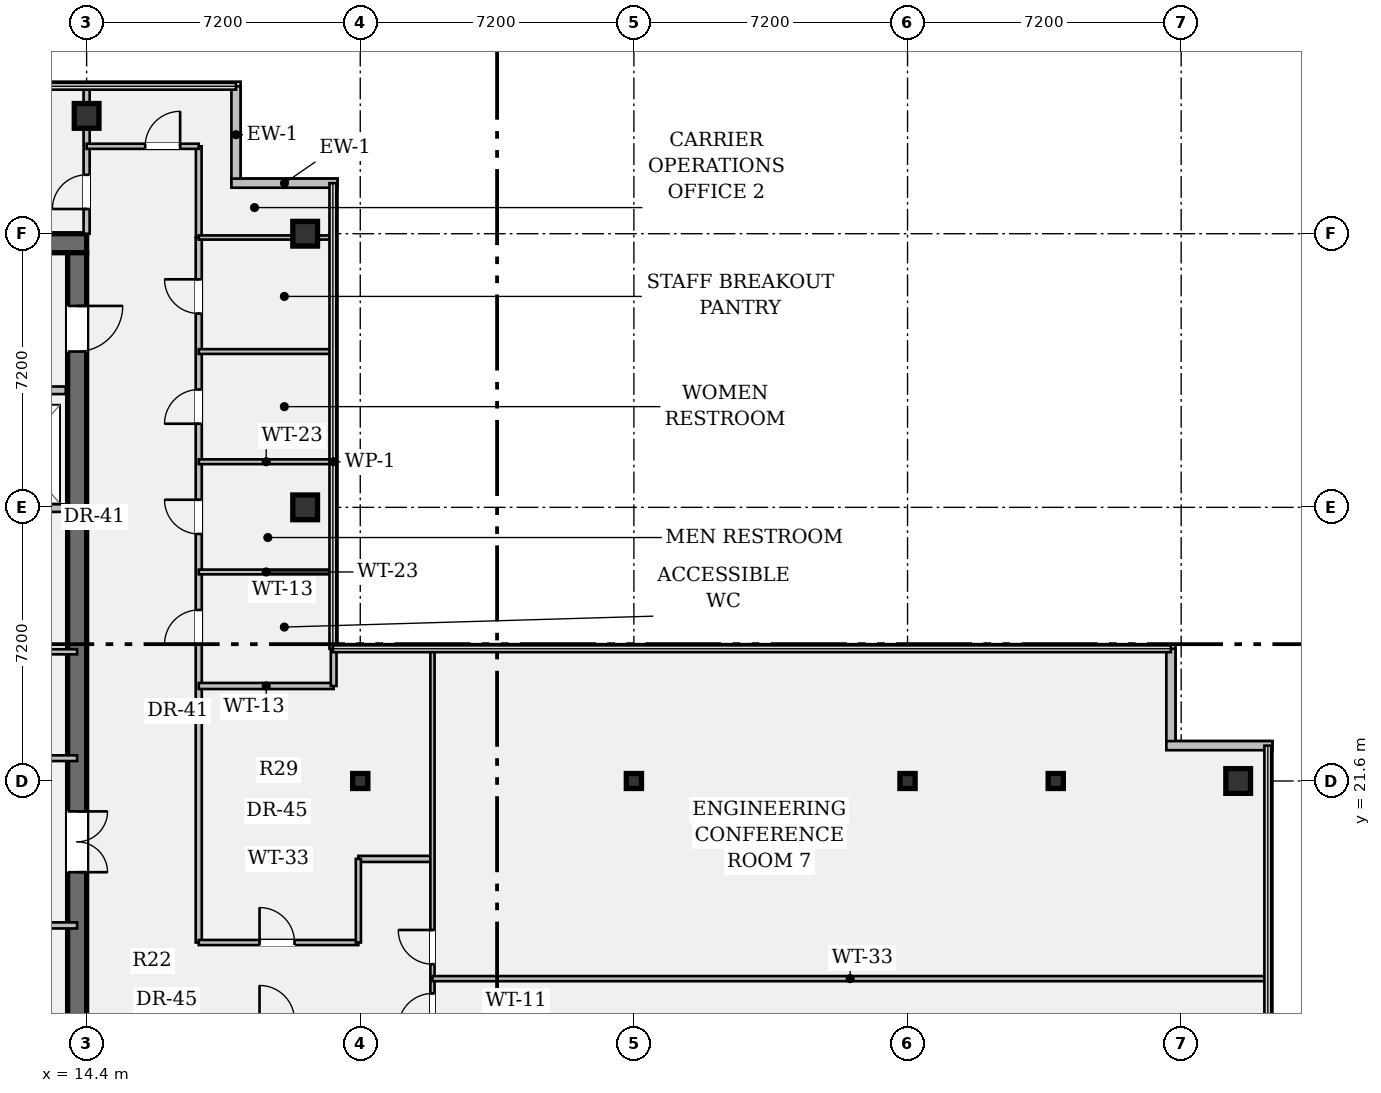
"""IFC4 building model, lengths in metres.
Left out: names, types, materials, properties, quantities, classifications, styles, units other than length and angle.
Written with IfcOpenShell. Run it as: python <this file> out.ifc"""

import sys

from ifc_helpers import new_model, si_unit, direction, frame, frame_2d, origin, origin_2d, place, context, subcontext, project, spatial, rectangle, hollow_rectangle, i_section, extrude, element, fill, save


model = new_model("IFC4")
c1 = context("Model", 3, precision=1e-05, world=origin(), true_north=direction((0.0, 1.0)))
c2 = subcontext(c1, "Body", "Model", "MODEL_VIEW")
j1 = project(units=[si_unit("LENGTHUNIT", "METRE"), si_unit("PLANEANGLEUNIT", "RADIAN")], contexts=[c1])
p1 = place(None, origin())
s1 = spatial("IfcSite", under=j1, at=p1, CompositionType="ELEMENT")
p2 = place(p1, origin())
s2 = spatial("IfcBuilding", under=s1, at=p2, CompositionType="ELEMENT")
p3 = place(p2, frame((0.0, 0.0, 258.65)))
s3 = spatial("IfcBuildingStorey", under=s2, at=p3, CompositionType="ELEMENT", Elevation=258.65)
p4 = place(p3, frame((0.5, 35.75, 0.0), z_axis=(0.0, 0.0, 1.0), x_axis=(1.0, 0.0, 0.0)))
e1 = element("IfcWall", 1, at=p4, inside=s3, PredefinedType="SHEAR", context=c2, shape_type="SweptSolid", body=[
    extrude(rectangle(XDim=13.9, YDim=0.5, at=frame_2d((6.95, 0.0))), origin(), (0.0, 0.0, 1.0), 3.24),
])
p5 = place(p3, frame((14.15, 35.5, 0.0), z_axis=(0.0, 0.0, 1.0), x_axis=(0.0, -1.0, 0.0)))
e2 = element("IfcWall", 2, at=p5, inside=s3, PredefinedType="SHEAR", context=c2, shape_type="SweptSolid", body=[
    extrude(rectangle(XDim=27.8, YDim=0.5, at=frame_2d((13.9, 0.0))), origin(), (0.0, 0.0, 1.0), 3.24),
])
p6 = place(p5, frame((1.4, 0.0, 0.0)))
e3 = element("IfcOpeningElement", 3, at=p6, cuts=e2, PredefinedType="OPENING", context=c2, shape_type="SweptSolid", body=[
    extrude(rectangle(XDim=1.2, YDim=2.15, at=frame_2d((0.6, 1.075))), frame((0.0, 0.262, 0.0), z_axis=(0.0, -1.0, 0.0), x_axis=(1.0, 0.0, 0.0)), (0.0, 0.0, 1.0), 0.524),
])
p7 = place(p5, frame((25.35, 0.0, 0.0)))
e4 = element("IfcOpeningElement", 4, at=p7, cuts=e2, PredefinedType="OPENING", context=c2, shape_type="SweptSolid", body=[
    extrude(rectangle(XDim=1.2, YDim=2.15, at=frame_2d((0.6, 1.075))), frame((0.0, 0.262, 0.0), z_axis=(0.0, -1.0, 0.0), x_axis=(1.0, 0.0, 0.0)), (0.0, 0.0, 1.0), 0.524),
])
p8 = place(p5, frame((14.7, 0.0, 0.0)))
e5 = element("IfcOpeningElement", 5, at=p8, cuts=e2, PredefinedType="OPENING", context=c2, shape_type="SweptSolid", body=[
    extrude(rectangle(XDim=1.6, YDim=2.2, at=frame_2d((0.8, 1.1))), frame((0.0, 0.262, 0.0), z_axis=(0.0, -1.0, 0.0), x_axis=(1.0, 0.0, 0.0)), (0.0, 0.0, 1.0), 0.524),
])
for number, where, z_axis, x_axis in (
    (6, (14.4, 39.1, 0.0), (0.0, 0.0, 1.0), (1.0, 0.0, 0.0)),
    (7, (20.15, 28.8, 0.0), (0.0, 0.0, 1.0), (1.0, 0.0, 0.0)),
    (8, (20.15, 36.0, 0.0), (0.0, 0.0, 1.0), (1.0, 0.0, 0.0)),
):
    element("IfcColumn", number, at=place(p3, frame(where, z_axis=z_axis, x_axis=x_axis)), inside=s3, PredefinedType="COLUMN", context=c2, shape_type="SweptSolid", body=[
        extrude(hollow_rectangle(XDim=0.65, YDim=0.65, WallThickness=0.04, at=origin_2d()), origin(), (0.0, 0.0, 1.0), 3.24),
    ])
for number, where, z_axis, x_axis in (
    (9, (21.6, 21.6, 0.0), (0.0, 0.0, 1.0), (1.0, 0.0, 0.0)),
    (10, (28.8, 21.6, 0.0), (0.0, 0.0, 1.0), (1.0, 0.0, 0.0)),
    (11, (36.0, 21.6, 0.0), (0.0, 0.0, 1.0), (1.0, 0.0, 0.0)),
    (12, (39.9, 21.6, 0.0), (0.0, 0.0, 1.0), (1.0, 0.0, 0.0)),
):
    element("IfcColumn", number, at=place(p3, frame(where, z_axis=z_axis, x_axis=x_axis)), inside=s3, PredefinedType="COLUMN", context=c2, shape_type="SweptSolid", body=[
        extrude(i_section(OverallWidth=0.399, OverallDepth=0.394, WebThickness=0.023, FlangeThickness=0.037, FilletRadius=0.018, at=origin_2d()), origin(), (0.0, 0.0, 1.0), 3.24),
    ])
p9 = place(p3, frame((44.7, 21.6, 0.0), z_axis=(0.0, 0.0, 1.0), x_axis=(1.0, 0.0, 0.0)))
e13 = element("IfcColumn", 13, at=p9, inside=s3, PredefinedType="COLUMN", context=c2, shape_type="SweptSolid", body=[
    extrude(hollow_rectangle(XDim=0.65, YDim=0.65, WallThickness=0.04, at=origin_2d()), origin(), (0.0, 0.0, 1.0), 3.24),
])
p10 = place(p3, frame((18.33, 39.88, 0.0), z_axis=(0.0, 0.0, 1.0), x_axis=(0.0, -1.0, 0.0)))
e14 = element("IfcWall", 14, at=p10, inside=s3, PredefinedType="STANDARD", context=c2, shape_type="SweptSolid", body=[
    extrude(rectangle(XDim=2.55, YDim=0.24, at=frame_2d((1.275, 0.0))), origin(), (0.0, 0.0, 1.0), 3.24),
])
p11 = place(p3, frame((18.21, 37.33, 0.0), z_axis=(0.0, 0.0, 1.0), x_axis=(1.0, 0.0, 0.0)))
e15 = element("IfcWall", 15, at=p11, inside=s3, PredefinedType="STANDARD", context=c2, shape_type="SweptSolid", body=[
    extrude(rectangle(XDim=2.79, YDim=0.24, at=frame_2d((1.395, 0.0))), origin(), (0.0, 0.0, 1.0), 3.24),
])
p12 = place(p3, frame((42.93, 25.08, 0.0), z_axis=(0.0, 0.0, 1.0), x_axis=(0.0, -1.0, 0.0)))
e16 = element("IfcWall", 16, at=p12, inside=s3, PredefinedType="STANDARD", context=c2, shape_type="SweptSolid", body=[
    extrude(rectangle(XDim=2.55, YDim=0.24, at=frame_2d((1.275, 0.0))), origin(), (0.0, 0.0, 1.0), 3.24),
])
p13 = place(p3, frame((42.81, 22.53, 0.0), z_axis=(0.0, 0.0, 1.0), x_axis=(1.0, 0.0, 0.0)))
e17 = element("IfcWall", 17, at=p13, inside=s3, PredefinedType="STANDARD", context=c2, shape_type="SweptSolid", body=[
    extrude(rectangle(XDim=2.79, YDim=0.24, at=frame_2d((1.395, 0.0))), origin(), (0.0, 0.0, 1.0), 3.24),
])
p14 = place(p3, frame((8.7, 31.88, 0.0), z_axis=(0.0, 0.0, 1.0), x_axis=(1.0, 0.0, 0.0)))
e18 = element("IfcWall", 18, at=p14, inside=s3, PredefinedType="PARTITIONING", context=c2, shape_type="SweptSolid", body=[
    extrude(rectangle(XDim=5.15, YDim=0.2, at=frame_2d((2.575, 0.0))), origin(), (0.0, 0.0, 1.0), 3.24),
])
p15 = place(p14, frame((0.75, 0.0, 0.0)))
e19 = element("IfcOpeningElement", 19, at=p15, cuts=e18, PredefinedType="OPENING", context=c2, shape_type="SweptSolid", body=[
    extrude(rectangle(XDim=1.2, YDim=2.2, at=frame_2d((0.6, 1.1))), frame((0.0, 0.112, 0.0), z_axis=(0.0, -1.0, 0.0), x_axis=(1.0, 0.0, 0.0)), (0.0, 0.0, 1.0), 0.224),
])
p16 = place(p14, frame((3.25, 0.0, 0.0)))
e20 = element("IfcOpeningElement", 20, at=p16, cuts=e18, PredefinedType="OPENING", context=c2, shape_type="SweptSolid", body=[
    extrude(rectangle(XDim=1.2, YDim=2.2, at=frame_2d((0.6, 1.1))), frame((0.0, 0.112, 0.0), z_axis=(0.0, -1.0, 0.0), x_axis=(1.0, 0.0, 0.0)), (0.0, 0.0, 1.0), 0.224),
])
p17 = place(p3, frame((8.7, 28.78, 0.0), z_axis=(0.0, 0.0, 1.0), x_axis=(1.0, 0.0, 0.0)))
e21 = element("IfcWall", 21, at=p17, inside=s3, PredefinedType="PARTITIONING", context=c2, shape_type="SweptSolid", body=[
    extrude(rectangle(XDim=5.15, YDim=0.2, at=frame_2d((2.575, 0.0))), origin(), (0.0, 0.0, 1.0), 3.24),
])
p18 = place(p3, frame((7.1, 22.2, 0.0), z_axis=(0.0, 0.0, 1.0), x_axis=(1.0, 0.0, 0.0)))
e22 = element("IfcWall", 22, at=p18, inside=s3, PredefinedType="PARTITIONING", context=c2, shape_type="SweptSolid", body=[
    extrude(rectangle(XDim=7.05, YDim=0.15, at=frame_2d((3.525, 0.0))), origin(), (0.0, 0.0, 1.0), 3.24),
])
p19 = place(p18, frame((2.4, 0.0, 0.0)))
e23 = element("IfcOpeningElement", 23, at=p19, cuts=e22, PredefinedType="OPENING", context=c2, shape_type="SweptSolid", body=[
    extrude(rectangle(XDim=0.92, YDim=2.15, at=frame_2d((0.46, 1.075))), frame((0.0, 0.087, 0.0), z_axis=(0.0, -1.0, 0.0), x_axis=(1.0, 0.0, 0.0)), (0.0, 0.0, 1.0), 0.174),
])
p20 = place(p3, frame((7.1, 25.0, 0.0), z_axis=(0.0, 0.0, 1.0), x_axis=(1.0, 0.0, 0.0)))
e24 = element("IfcWall", 24, at=p20, inside=s3, PredefinedType="PARTITIONING", context=c2, shape_type="SweptSolid", body=[
    extrude(rectangle(XDim=7.05, YDim=0.135, at=frame_2d((3.525, 0.0))), origin(), (0.0, 0.0, 1.0), 3.24),
])
p21 = place(p3, frame((5.15, 17.8, 0.0), z_axis=(0.0, 0.0, 1.0), x_axis=(1.0, 0.0, 0.0)))
e25 = element("IfcWall", 25, at=p21, inside=s3, PredefinedType="PARTITIONING", context=c2, shape_type="SweptSolid", body=[
    extrude(rectangle(XDim=9.0, YDim=0.16, at=frame_2d((4.5, 0.0))), origin(), (0.0, 0.0, 1.0), 3.24),
])
p22 = place(p21, frame((2.65, 0.0, 0.0)))
e26 = element("IfcOpeningElement", 26, at=p22, cuts=e25, PredefinedType="OPENING", context=c2, shape_type="SweptSolid", body=[
    extrude(rectangle(XDim=0.9, YDim=2.15, at=frame_2d((0.45, 1.075))), frame((0.0, 0.092, 0.0), z_axis=(0.0, -1.0, 0.0), x_axis=(1.0, 0.0, 0.0)), (0.0, 0.0, 1.0), 0.184),
])
p23 = place(p21, frame((6.15, 0.0, 0.0)))
e27 = element("IfcOpeningElement", 27, at=p23, cuts=e25, PredefinedType="OPENING", context=c2, shape_type="SweptSolid", body=[
    extrude(rectangle(XDim=0.92, YDim=2.15, at=frame_2d((0.46, 1.075))), frame((0.0, 0.092, 0.0), z_axis=(0.0, -1.0, 0.0), x_axis=(1.0, 0.0, 0.0)), (0.0, 0.0, 1.0), 0.184),
])
p24 = place(p3, frame((17.35, 17.35, 0.0), z_axis=(0.0, 0.0, 1.0), x_axis=(0.0, 1.0, 0.0)))
e28 = element("IfcWall", 28, at=p24, inside=s3, PredefinedType="PARTITIONING", context=c2, shape_type="SweptSolid", body=[
    extrude(rectangle(XDim=18.55, YDim=0.16, at=frame_2d((9.275, 0.0))), origin(), (0.0, 0.0, 1.0), 2.676),
])
p25 = place(p24, frame((7.85, 0.0, 0.0)))
e29 = element("IfcOpeningElement", 29, at=p25, cuts=e28, PredefinedType="OPENING", context=c2, shape_type="SweptSolid", body=[
    extrude(rectangle(XDim=0.9, YDim=2.15, at=frame_2d((0.45, 1.075))), frame((0.0, 0.092, 0.0), z_axis=(0.0, -1.0, 0.0), x_axis=(1.0, 0.0, 0.0)), (0.0, 0.0, 1.0), 0.184),
])
p26 = place(p24, frame((10.75, 0.0, 0.0)))
e30 = element("IfcOpeningElement", 30, at=p26, cuts=e28, PredefinedType="OPENING", context=c2, shape_type="SweptSolid", body=[
    extrude(rectangle(XDim=0.9, YDim=2.15, at=frame_2d((0.45, 1.075))), frame((0.0, 0.092, 0.0), z_axis=(0.0, -1.0, 0.0), x_axis=(1.0, 0.0, 0.0)), (0.0, 0.0, 1.0), 0.184),
])
p27 = place(p24, frame((13.65, 0.0, 0.0)))
e31 = element("IfcOpeningElement", 31, at=p27, cuts=e28, PredefinedType="OPENING", context=c2, shape_type="SweptSolid", body=[
    extrude(rectangle(XDim=0.9, YDim=2.15, at=frame_2d((0.45, 1.075))), frame((0.0, 0.092, 0.0), z_axis=(0.0, -1.0, 0.0), x_axis=(1.0, 0.0, 0.0)), (0.0, 0.0, 1.0), 0.184),
])
p28 = place(p24, frame((16.55, 0.0, 0.0)))
e32 = element("IfcOpeningElement", 32, at=p28, cuts=e28, PredefinedType="OPENING", context=c2, shape_type="SweptSolid", body=[
    extrude(rectangle(XDim=0.9, YDim=2.15, at=frame_2d((0.45, 1.075))), frame((0.0, 0.092, 0.0), z_axis=(0.0, -1.0, 0.0), x_axis=(1.0, 0.0, 0.0)), (0.0, 0.0, 1.0), 0.184),
])
p29 = place(p3, frame((17.35, 17.35, 0.0), z_axis=(0.0, 0.0, 1.0), x_axis=(1.0, 0.0, 0.0)))
e33 = element("IfcWall", 33, at=p29, inside=s3, PredefinedType="PARTITIONING", context=c2, shape_type="SweptSolid", body=[
    extrude(rectangle(XDim=4.2, YDim=0.135, at=frame_2d((2.1, 0.0))), origin(), (0.0, 0.0, 1.0), 2.808),
])
p30 = place(p29, frame((1.6, 0.0, 0.0)))
e34 = element("IfcOpeningElement", 34, at=p30, cuts=e33, PredefinedType="OPENING", context=c2, shape_type="SweptSolid", body=[
    extrude(rectangle(XDim=0.92, YDim=2.15, at=frame_2d((0.46, 1.075))), frame((0.0, 0.08, 0.0), z_axis=(0.0, -1.0, 0.0), x_axis=(1.0, 0.0, 0.0)), (0.0, 0.0, 1.0), 0.159),
])
p31 = place(p3, frame((21.55, 19.55, 0.0), z_axis=(0.0, 0.0, 1.0), x_axis=(1.0, 0.0, 0.0)))
e35 = element("IfcWall", 35, at=p31, inside=s3, PredefinedType="PARTITIONING", context=c2, shape_type="SweptSolid", body=[
    extrude(rectangle(XDim=1.95, YDim=0.16, at=frame_2d((0.975, 0.0))), origin(), (0.0, 0.0, 1.0), 2.676),
])
p32 = place(p3, frame((21.55, 17.35, 0.0), z_axis=(0.0, 0.0, 1.0), x_axis=(0.0, 1.0, 0.0)))
e36 = element("IfcWall", 36, at=p32, inside=s3, PredefinedType="PARTITIONING", context=c2, shape_type="SweptSolid", body=[
    extrude(rectangle(XDim=2.2, YDim=0.135, at=frame_2d((1.1, 0.0))), origin(), (0.0, 0.0, 1.0), 2.676),
])
p33 = place(p3, frame((23.5, 6.52, 0.0), z_axis=(0.0, 0.0, 1.0), x_axis=(0.0, 1.0, 0.0)))
e37 = element("IfcWall", 37, at=p33, inside=s3, PredefinedType="PARTITIONING", context=c2, shape_type="SweptSolid", body=[
    extrude(rectangle(XDim=18.56, YDim=0.11, at=frame_2d((9.28, 0.0))), origin(), (0.0, 0.0, 1.0), 2.676),
])
p34 = place(p33, frame((8.59, 0.0, 0.0)))
e38 = element("IfcOpeningElement", 38, at=p34, cuts=e37, PredefinedType="OPENING", context=c2, shape_type="SweptSolid", body=[
    extrude(rectangle(XDim=0.9, YDim=2.15, at=frame_2d((0.45, 1.075))), frame((0.0, 0.067, 0.0), z_axis=(0.0, -1.0, 0.0), x_axis=(1.0, 0.0, 0.0)), (0.0, 0.0, 1.0), 0.134),
])
p35 = place(p33, frame((10.26, 0.0, 0.0)))
e39 = element("IfcOpeningElement", 39, at=p35, cuts=e37, PredefinedType="OPENING", context=c2, shape_type="SweptSolid", body=[
    extrude(rectangle(XDim=0.9, YDim=2.15, at=frame_2d((0.45, 1.075))), frame((0.0, 0.067, 0.0), z_axis=(0.0, -1.0, 0.0), x_axis=(1.0, 0.0, 0.0)), (0.0, 0.0, 1.0), 0.134),
])
p36 = place(p3, frame((14.4, 36.0, 0.0), z_axis=(0.0, 0.0, 1.0), x_axis=(0.0, 1.0, 0.0)))
e40 = element("IfcWall", 40, at=p36, inside=s3, PredefinedType="PARTITIONING", context=c2, shape_type="SweptSolid", body=[
    extrude(rectangle(XDim=3.88, YDim=0.16, at=frame_2d((1.94, 0.0))), origin(), (0.0, 0.0, 1.0), 2.676),
])
p37 = place(p36, frame((0.65, 0.0, 0.0)))
e41 = element("IfcOpeningElement", 41, at=p37, cuts=e40, PredefinedType="OPENING", context=c2, shape_type="SweptSolid", body=[
    extrude(rectangle(XDim=0.9, YDim=2.15, at=frame_2d((0.45, 1.075))), frame((0.0, 0.092, 0.0), z_axis=(0.0, -1.0, 0.0), x_axis=(1.0, 0.0, 0.0)), (0.0, 0.0, 1.0), 0.184),
])
p38 = place(p3, frame((17.35, 35.9, 0.0), z_axis=(0.0, 0.0, 1.0), x_axis=(0.0, 1.0, 0.0)))
e42 = element("IfcWall", 42, at=p38, inside=s3, PredefinedType="PARTITIONING", context=c2, shape_type="SweptSolid", body=[
    extrude(rectangle(XDim=2.4, YDim=0.15, at=frame_2d((1.2, 0.0))), origin(), (0.0, 0.0, 1.0), 2.676),
])
p39 = place(p3, frame((14.4, 38.3, 0.0), z_axis=(0.0, 0.0, 1.0), x_axis=(1.0, 0.0, 0.0)))
e43 = element("IfcWall", 43, at=p39, inside=s3, PredefinedType="PARTITIONING", context=c2, shape_type="SweptSolid", body=[
    extrude(rectangle(XDim=2.95, YDim=0.135, at=frame_2d((1.475, 0.0))), origin(), (0.0, 0.0, 1.0), 3.24),
])
p40 = place(p39, frame((1.54, 0.0, 0.0)))
e44 = element("IfcOpeningElement", 44, at=p40, cuts=e43, PredefinedType="OPENING", context=c2, shape_type="SweptSolid", body=[
    extrude(rectangle(XDim=0.92, YDim=2.15, at=frame_2d((0.46, 1.075))), frame((0.0, 0.08, 0.0), z_axis=(0.0, -1.0, 0.0), x_axis=(1.0, 0.0, 0.0)), (0.0, 0.0, 1.0), 0.159),
])
p41 = place(p3, frame((17.35, 35.9, 0.0), z_axis=(0.0, 0.0, 1.0), x_axis=(1.0, 0.0, 0.0)))
e45 = element("IfcWall", 45, at=p41, inside=s3, PredefinedType="PARTITIONING", context=c2, shape_type="SweptSolid", body=[
    extrude(rectangle(XDim=3.53, YDim=0.11, at=frame_2d((1.765, 0.0))), origin(), (0.0, 0.0, 1.0), 2.676),
])
p42 = place(p3, frame((17.35, 24.1, 0.0), z_axis=(0.0, 0.0, 1.0), x_axis=(1.0, 0.0, 0.0)))
e46 = element("IfcWall", 46, at=p42, inside=s3, PredefinedType="PARTITIONING", context=c2, shape_type="SweptSolid", body=[
    extrude(rectangle(XDim=3.55, YDim=0.16, at=frame_2d((1.775, 0.0))), origin(), (0.0, 0.0, 1.0), 2.808),
])
p43 = place(p3, frame((20.9, 24.1, 0.0), z_axis=(0.0, 0.0, 1.0), x_axis=(0.0, 1.0, 0.0)))
e47 = element("IfcWall", 47, at=p43, inside=s3, PredefinedType="PARTITIONING", context=c2, shape_type="SweptSolid", body=[
    extrude(rectangle(XDim=11.8, YDim=0.15, at=frame_2d((5.9, 0.0))), origin(), (0.0, 0.0, 1.0), 3.24),
])
for number, where, z_axis, x_axis in (
    (48, (17.35, 27.1, 0.0), (0.0, 0.0, 1.0), (1.0, 0.0, 0.0)),
    (49, (17.35, 30.0, 0.0), (0.0, 0.0, 1.0), (1.0, 0.0, 0.0)),
    (50, (17.35, 32.9, 0.0), (0.0, 0.0, 1.0), (1.0, 0.0, 0.0)),
):
    element("IfcWall", number, at=place(p3, frame(where, z_axis=z_axis, x_axis=x_axis)), inside=s3, PredefinedType="PARTITIONING", context=c2, shape_type="SweptSolid", body=[
        extrude(rectangle(XDim=3.55, YDim=0.125, at=frame_2d((1.775, 0.0))), origin(), (0.0, 0.0, 1.0), 2.808),
    ])
p44 = place(p3, frame((23.5, 16.4, 0.0), z_axis=(0.0, 0.0, 1.0), x_axis=(1.0, 0.0, 0.0)))
e51 = element("IfcWall", 51, at=p44, inside=s3, PredefinedType="PARTITIONING", context=c2, shape_type="SweptSolid", body=[
    extrude(rectangle(XDim=21.98, YDim=0.135, at=frame_2d((10.99, 0.0))), origin(), (0.0, 0.0, 1.0), 2.676),
])
p45 = place(p6, origin())
e52 = element("IfcDoor", 52, at=p45, inside=s3, OperationType="SINGLE_SWING_LEFT", PredefinedType="DOOR", context=c2, shape_type="SweptSolid", body=[
    extrude(rectangle(XDim=1.2, YDim=2.15, at=frame_2d((0.6, 1.075))), frame((0.0, 0.025, 0.0), z_axis=(0.0, -1.0, 0.0), x_axis=(1.0, 0.0, 0.0)), (0.0, 0.0, 1.0), 0.05),
])
fill(e3, e52)
p46 = place(p8, origin())
e53 = element("IfcDoor", 53, at=p46, inside=s3, OperationType="DOUBLE_DOOR_SINGLE_SWING", PredefinedType="DOOR", context=c2, shape_type="SweptSolid", body=[
    extrude(rectangle(XDim=1.6, YDim=2.2, at=frame_2d((0.8, 1.1))), frame((0.0, 0.025, 0.0), z_axis=(0.0, -1.0, 0.0), x_axis=(1.0, 0.0, 0.0)), (0.0, 0.0, 1.0), 0.05),
])
fill(e5, e53)
p47 = place(p37, origin())
e54 = element("IfcDoor", 54, at=p47, inside=s3, OperationType="SINGLE_SWING_LEFT", PredefinedType="DOOR", context=c2, shape_type="SweptSolid", body=[
    extrude(rectangle(XDim=0.9, YDim=2.15, at=frame_2d((0.45, 1.075))), frame((0.0, 0.025, 0.0), z_axis=(0.0, -1.0, 0.0), x_axis=(1.0, 0.0, 0.0)), (0.0, 0.0, 1.0), 0.05),
])
fill(e41, e54)
p48 = place(p40, origin())
e55 = element("IfcDoor", 55, at=p48, inside=s3, OperationType="SINGLE_SWING_RIGHT", PredefinedType="DOOR", context=c2, shape_type="SweptSolid", body=[
    extrude(rectangle(XDim=0.92, YDim=2.15, at=frame_2d((0.46, 1.075))), frame((0.0, 0.025, 0.0), z_axis=(0.0, -1.0, 0.0), x_axis=(1.0, 0.0, 0.0)), (0.0, 0.0, 1.0), 0.05),
])
fill(e44, e55)
p49 = place(p25, origin())
e56 = element("IfcDoor", 56, at=p49, inside=s3, OperationType="SINGLE_SWING_LEFT", PredefinedType="DOOR", context=c2, shape_type="SweptSolid", body=[
    extrude(rectangle(XDim=0.9, YDim=2.15, at=frame_2d((0.45, 1.075))), frame((0.0, 0.025, 0.0), z_axis=(0.0, -1.0, 0.0), x_axis=(1.0, 0.0, 0.0)), (0.0, 0.0, 1.0), 0.05),
])
fill(e29, e56)
p50 = place(p26, origin())
e57 = element("IfcDoor", 57, at=p50, inside=s3, OperationType="SINGLE_SWING_RIGHT", PredefinedType="DOOR", context=c2, shape_type="SweptSolid", body=[
    extrude(rectangle(XDim=0.9, YDim=2.15, at=frame_2d((0.45, 1.075))), frame((0.0, 0.025, 0.0), z_axis=(0.0, -1.0, 0.0), x_axis=(1.0, 0.0, 0.0)), (0.0, 0.0, 1.0), 0.05),
])
fill(e30, e57)
p51 = place(p27, origin())
e58 = element("IfcDoor", 58, at=p51, inside=s3, OperationType="SINGLE_SWING_LEFT", PredefinedType="DOOR", context=c2, shape_type="SweptSolid", body=[
    extrude(rectangle(XDim=0.9, YDim=2.15, at=frame_2d((0.45, 1.075))), frame((0.0, 0.025, 0.0), z_axis=(0.0, -1.0, 0.0), x_axis=(1.0, 0.0, 0.0)), (0.0, 0.0, 1.0), 0.05),
])
fill(e31, e58)
p52 = place(p28, origin())
e59 = element("IfcDoor", 59, at=p52, inside=s3, OperationType="SINGLE_SWING_RIGHT", PredefinedType="DOOR", context=c2, shape_type="SweptSolid", body=[
    extrude(rectangle(XDim=0.9, YDim=2.15, at=frame_2d((0.45, 1.075))), frame((0.0, 0.025, 0.0), z_axis=(0.0, -1.0, 0.0), x_axis=(1.0, 0.0, 0.0)), (0.0, 0.0, 1.0), 0.05),
])
fill(e32, e59)
p53 = place(p30, origin())
e60 = element("IfcDoor", 60, at=p53, inside=s3, OperationType="SINGLE_SWING_LEFT", PredefinedType="DOOR", context=c2, shape_type="SweptSolid", body=[
    extrude(rectangle(XDim=0.92, YDim=2.15, at=frame_2d((0.46, 1.075))), frame((0.0, 0.025, 0.0), z_axis=(0.0, -1.0, 0.0), x_axis=(1.0, 0.0, 0.0)), (0.0, 0.0, 1.0), 0.05),
])
fill(e34, e60)
p54 = place(p34, origin())
e61 = element("IfcDoor", 61, at=p54, inside=s3, OperationType="SINGLE_SWING_LEFT", PredefinedType="DOOR", context=c2, shape_type="SweptSolid", body=[
    extrude(rectangle(XDim=0.9, YDim=2.15, at=frame_2d((0.45, 1.075))), frame((0.0, 0.025, 0.0), z_axis=(0.0, -1.0, 0.0), x_axis=(1.0, 0.0, 0.0)), (0.0, 0.0, 1.0), 0.05),
])
fill(e38, e61)
p55 = place(p35, origin())
e62 = element("IfcDoor", 62, at=p55, inside=s3, OperationType="SINGLE_SWING_RIGHT", PredefinedType="DOOR", context=c2, shape_type="SweptSolid", body=[
    extrude(rectangle(XDim=0.9, YDim=2.15, at=frame_2d((0.45, 1.075))), frame((0.0, 0.025, 0.0), z_axis=(0.0, -1.0, 0.0), x_axis=(1.0, 0.0, 0.0)), (0.0, 0.0, 1.0), 0.05),
])
fill(e39, e62)
save(model, sys.argv[1])
